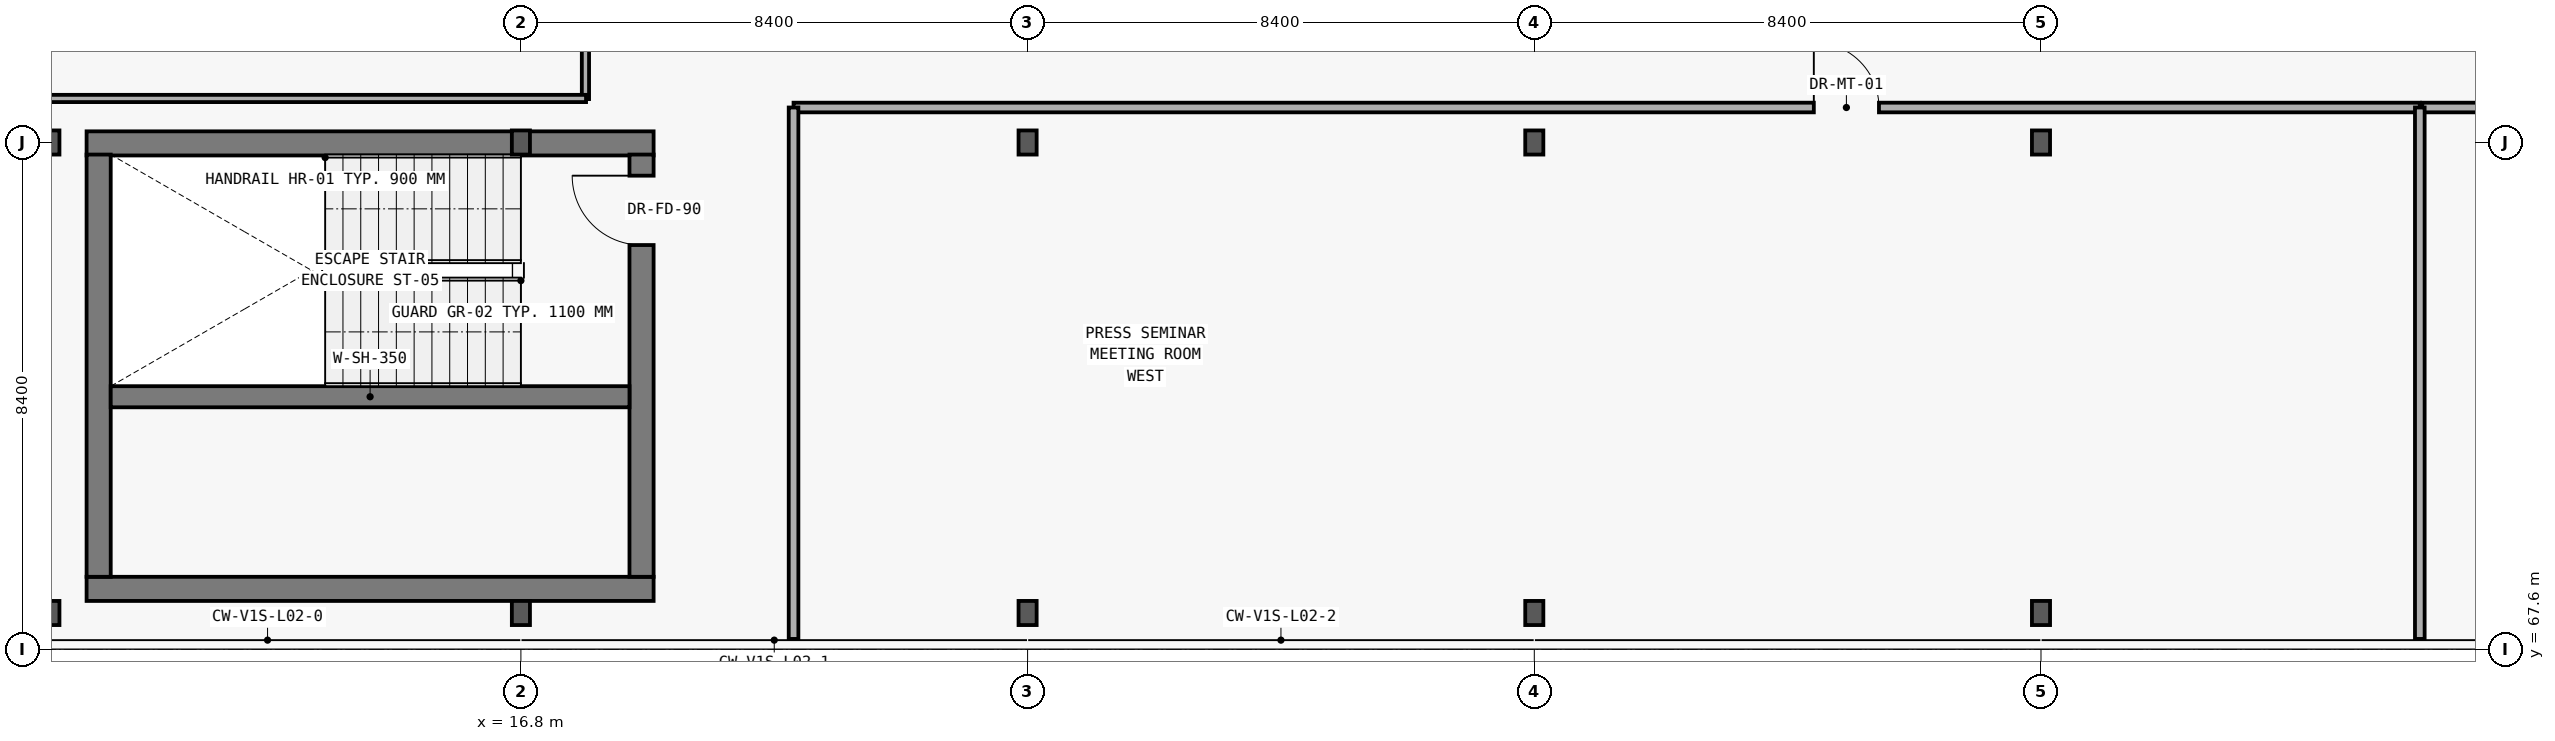
"""IFC4 building model, lengths in metres.
Left out: names, types, materials, properties, quantities, classifications, styles, units other than length and angle.
Written with IfcOpenShell. Run it as: python <this file> out.ifc"""

import sys

from ifc_helpers import new_model, si_unit, direction, frame, frame_2d, origin, origin_2d, place, context, subcontext, project, spatial, rectangle, i_section, extrude, element, fill, save


model = new_model("IFC4")
c1 = context("Model", 3, precision=1e-05, world=origin(), true_north=direction((0.0, 1.0)))
c2 = subcontext(c1, "Body", "Model", "MODEL_VIEW")
j1 = project(units=[si_unit("LENGTHUNIT", "METRE"), si_unit("PLANEANGLEUNIT", "RADIAN")], contexts=[c1])
p1 = place(None, origin())
s1 = spatial("IfcSite", under=j1, at=p1, CompositionType="ELEMENT")
p2 = place(p1, origin())
s2 = spatial("IfcBuilding", under=s1, at=p2, CompositionType="ELEMENT")
p3 = place(p2, frame((0.0, 0.0, 10.8)))
s3 = spatial("IfcBuildingStorey", under=s2, at=p3, CompositionType="ELEMENT", Elevation=10.8)
for number, where, z_axis, x_axis in (
    (1, (9.0, 68.2, 0.0), (0.0, 0.0, 1.0), (1.0, 0.0, 0.0)),
    (2, (9.0, 76.0, 0.0), (0.0, 0.0, 1.0), (1.0, 0.0, 0.0)),
    (3, (16.8, 68.2, 0.0), (0.0, 0.0, 1.0), (1.0, 0.0, 0.0)),
    (4, (16.8, 76.0, 0.0), (0.0, 0.0, 1.0), (1.0, 0.0, 0.0)),
    (5, (25.2, 68.2, 0.0), (0.0, 0.0, 1.0), (1.0, 0.0, 0.0)),
    (6, (25.2, 76.0, 0.0), (0.0, 0.0, 1.0), (1.0, 0.0, 0.0)),
    (7, (33.6, 68.2, 0.0), (0.0, 0.0, 1.0), (1.0, 0.0, 0.0)),
    (8, (33.6, 76.0, 0.0), (0.0, 0.0, 1.0), (1.0, 0.0, 0.0)),
    (9, (42.0, 68.2, 0.0), (0.0, 0.0, 1.0), (1.0, 0.0, 0.0)),
    (10, (42.0, 76.0, 0.0), (0.0, 0.0, 1.0), (1.0, 0.0, 0.0)),
):
    element("IfcColumn", number, at=place(p3, frame(where, z_axis=z_axis, x_axis=x_axis)), inside=s3, PredefinedType="COLUMN", context=c2, shape_type="SweptSolid", body=[
        extrude(i_section(OverallWidth=0.3, OverallDepth=0.4, WebThickness=0.013, FlangeThickness=0.024, at=origin_2d()), origin(), (0.0, 0.0, 1.0), 4.2),
    ])
for number, where, z_axis, x_axis in (
    (11, (9.6, 68.6, 0.0), (0.0, 0.0, 1.0), (1.0, 0.0, 0.0)),
    (12, (19.0, 75.985, 0.0), (0.0, 0.0, 1.0), (-1.0, 0.0, 0.0)),
):
    element("IfcWall", number, at=place(p3, frame(where, z_axis=z_axis, x_axis=x_axis)), inside=s3, PredefinedType="SHEAR", context=c2, shape_type="SweptSolid", body=[
        extrude(rectangle(XDim=9.4, YDim=0.4, at=frame_2d((4.7, 0.0))), origin(), (0.0, 0.0, 1.0), 3.92),
    ])
p4 = place(p3, frame((9.8, 75.8, 0.0), z_axis=(0.0, 0.0, 1.0), x_axis=(0.0, -1.0, 0.0)))
e13 = element("IfcWall", 13, at=p4, inside=s3, PredefinedType="SHEAR", context=c2, shape_type="SweptSolid", body=[
    extrude(rectangle(XDim=7.0, YDim=0.4, at=frame_2d((3.5, 0.0))), origin(), (0.0, 0.0, 1.0), 3.92),
])
p5 = place(p3, frame((18.8, 68.8, 0.0), z_axis=(0.0, 0.0, 1.0), x_axis=(0.0, 1.0, 0.0)))
e14 = element("IfcWall", 14, at=p5, inside=s3, PredefinedType="SHEAR", context=c2, shape_type="SweptSolid", body=[
    extrude(rectangle(XDim=7.0, YDim=0.4, at=frame_2d((3.5, 0.0))), origin(), (0.0, 0.0, 1.0), 3.92),
])
p6 = place(p5, frame((5.5, 0.0, 0.0)))
e15 = element("IfcOpeningElement", 15, at=p6, cuts=e14, PredefinedType="OPENING", context=c2, shape_type="SweptSolid", body=[
    extrude(rectangle(XDim=1.15, YDim=2.2, at=frame_2d((0.575, 1.1))), frame((0.0, 0.21, 0.0), z_axis=(0.0, -1.0, 0.0), x_axis=(1.0, 0.0, 0.0)), (0.0, 0.0, 1.0), 0.42),
])
p7 = place(p3, frame((10.0, 71.785, 0.0), z_axis=(0.0, 0.0, 1.0), x_axis=(1.0, 0.0, 0.0)))
e16 = element("IfcWall", 16, at=p7, inside=s3, PredefinedType="SHEAR", context=c2, shape_type="SweptSolid", body=[
    extrude(rectangle(XDim=8.6, YDim=0.35, at=frame_2d((4.3, 0.0))), origin(), (0.0, 0.0, 1.0), 3.92),
])
p8 = place(p3, frame((17.87, 76.72, 0.0), z_axis=(0.0, 0.0, 1.0), x_axis=(0.0, 1.0, 0.0)))
e17 = element("IfcWall", 17, at=p8, inside=s3, PredefinedType="PARTITIONING", context=c2, shape_type="SweptSolid", body=[
    extrude(rectangle(XDim=4.96, YDim=0.12, at=frame_2d((2.48, 0.0))), origin(), (0.0, 0.0, 1.0), 3.02),
])
p9 = place(p8, frame((3.006, 0.0, 0.0)))
e18 = element("IfcOpeningElement", 18, at=p9, cuts=e17, PredefinedType="OPENING", context=c2, shape_type="SweptSolid", body=[
    extrude(rectangle(XDim=0.92, YDim=2.15, at=frame_2d((0.46, 1.075))), frame((0.0, 0.07, 0.0), z_axis=(0.0, -1.0, 0.0), x_axis=(1.0, 0.0, 0.0)), (0.0, 0.0, 1.0), 0.14),
])
p10 = place(p3, frame((21.32, 76.58, 0.0), z_axis=(0.0, 0.0, 1.0), x_axis=(1.0, 0.0, 0.0)))
e19 = element("IfcWall", 19, at=p10, inside=s3, PredefinedType="PARTITIONING", context=c2, shape_type="SweptSolid", body=[
    extrude(rectangle(XDim=26.96, YDim=0.16, at=frame_2d((13.48, 0.0))), origin(), (0.0, 0.0, 1.0), 3.02),
])
p11 = place(p10, frame((16.914, 0.0, 0.0)))
e20 = element("IfcOpeningElement", 20, at=p11, cuts=e19, PredefinedType="OPENING", context=c2, shape_type="SweptSolid", body=[
    extrude(rectangle(XDim=1.08, YDim=2.25, at=frame_2d((0.54, 1.125))), frame((0.0, 0.09, 0.0), z_axis=(0.0, -1.0, 0.0), x_axis=(1.0, 0.0, 0.0)), (0.0, 0.0, 1.0), 0.18),
])
p12 = place(p3, frame((48.32, 76.58, 0.0), z_axis=(0.0, 0.0, 1.0), x_axis=(1.0, 0.0, 0.0)))
e21 = element("IfcWall", 21, at=p12, inside=s3, PredefinedType="PARTITIONING", context=c2, shape_type="SweptSolid", body=[
    extrude(rectangle(XDim=31.16, YDim=0.16, at=frame_2d((15.58, 0.0))), origin(), (0.0, 0.0, 1.0), 3.02),
])
p13 = place(p12, frame((14.28, 0.0, 0.0)))
e22 = element("IfcOpeningElement", 22, at=p13, cuts=e21, PredefinedType="OPENING", context=c2, shape_type="SweptSolid", body=[
    extrude(rectangle(XDim=1.08, YDim=2.25, at=frame_2d((0.54, 1.125))), frame((0.0, 0.09, 0.0), z_axis=(0.0, -1.0, 0.0), x_axis=(1.0, 0.0, 0.0)), (0.0, 0.0, 1.0), 0.18),
])
p14 = place(p3, frame((8.64, 76.73, 0.0), z_axis=(0.0, 0.0, 1.0), x_axis=(1.0, 0.0, 0.0)))
e23 = element("IfcWall", 23, at=p14, inside=s3, PredefinedType="PARTITIONING", context=c2, shape_type="SweptSolid", body=[
    extrude(rectangle(XDim=9.24, YDim=0.12, at=frame_2d((4.62, 0.0))), origin(), (0.0, 0.0, 1.0), 3.02),
])
for number, where, z_axis, x_axis in (
    (24, (21.32, 67.77, 0.0), (0.0, 0.0, 1.0), (0.0, 1.0, 0.0)),
    (25, (48.28, 67.77, 0.0), (0.0, 0.0, 1.0), (0.0, 1.0, 0.0)),
):
    element("IfcWall", number, at=place(p3, frame(where, z_axis=z_axis, x_axis=x_axis)), inside=s3, PredefinedType="PARTITIONING", context=c2, shape_type="SweptSolid", body=[
        extrude(rectangle(XDim=8.81, YDim=0.16, at=frame_2d((4.405, 0.0))), origin(), (0.0, 0.0, 1.0), 3.02),
    ])
p15 = place(p6, origin())
e26 = element("IfcDoor", 26, at=p15, inside=s3, OperationType="SINGLE_SWING_RIGHT", PredefinedType="DOOR", context=c2, shape_type="SweptSolid", body=[
    extrude(rectangle(XDim=1.15, YDim=2.2, at=frame_2d((0.575, 1.1))), frame((0.0, 0.025, 0.0), z_axis=(0.0, -1.0, 0.0), x_axis=(1.0, 0.0, 0.0)), (0.0, 0.0, 1.0), 0.05),
])
fill(e15, e26)
p16 = place(p11, origin())
e27 = element("IfcDoor", 27, at=p16, inside=s3, OperationType="SINGLE_SWING_LEFT", PredefinedType="DOOR", context=c2, shape_type="SweptSolid", body=[
    extrude(rectangle(XDim=1.08, YDim=2.25, at=frame_2d((0.54, 1.125))), frame((0.0, 0.025, 0.0), z_axis=(0.0, -1.0, 0.0), x_axis=(1.0, 0.0, 0.0)), (0.0, 0.0, 1.0), 0.05),
])
fill(e20, e27)
save(model, sys.argv[1])
